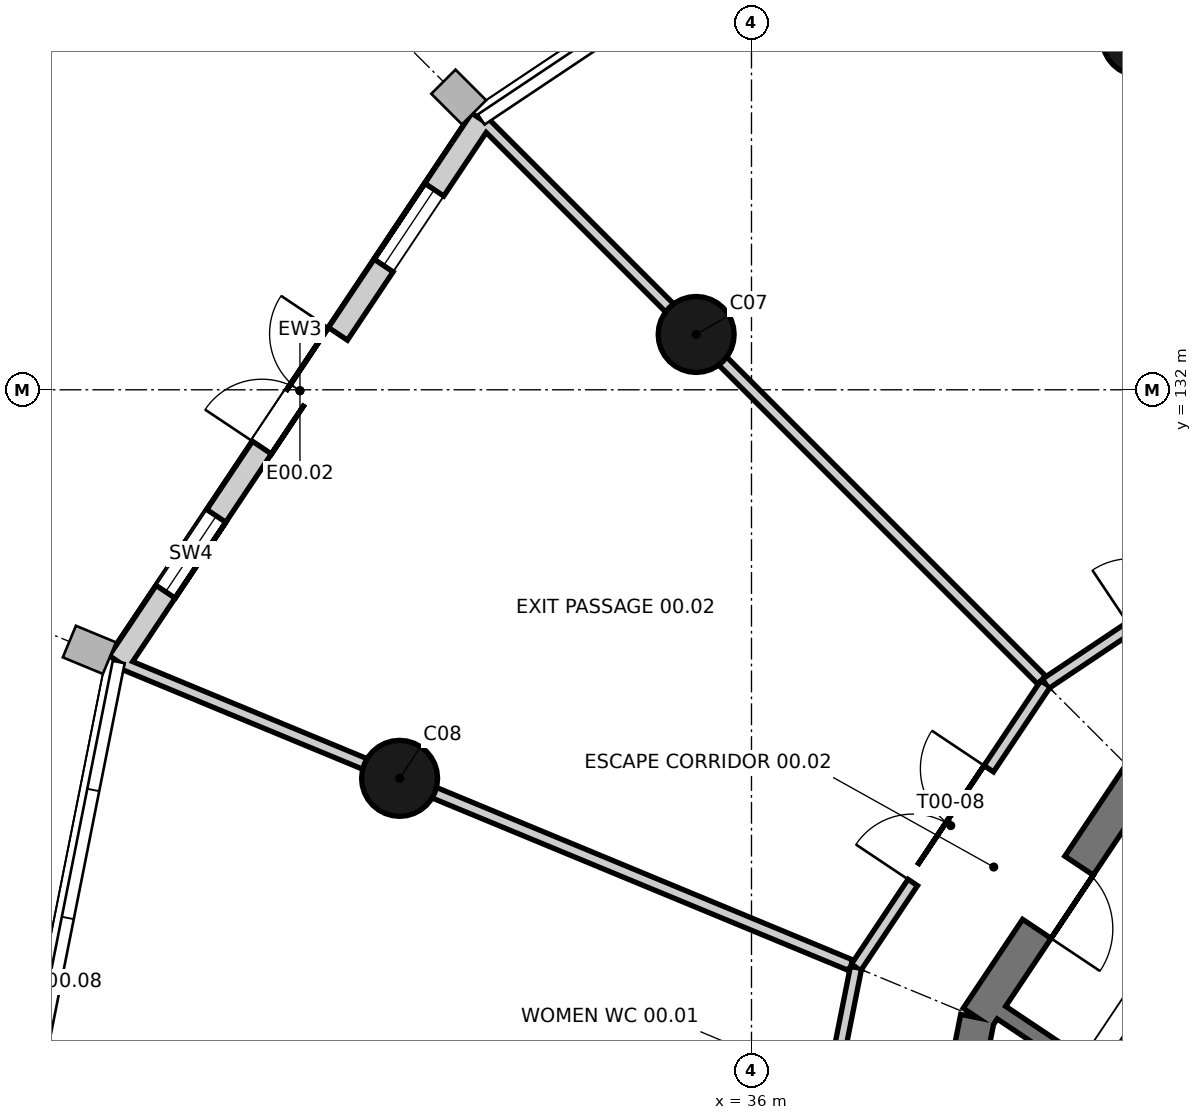
"""IFC4 building model, lengths in metres.
Left out: names, types, materials, properties, quantities, classifications, styles, units other than length and angle.
Written with IfcOpenShell. Run it as: python <this file> out.ifc"""

import sys

from ifc_helpers import new_model, si_unit, direction, frame, frame_2d, origin, origin_2d, place, context, subcontext, project, spatial, polyline, rectangle, circle, outline, extrude, element, fill, save


model = new_model("IFC4")
c1 = context("Model", 3, precision=1e-05, world=origin(), true_north=direction((0.0, 1.0)))
c2 = subcontext(c1, "Body", "Model", "MODEL_VIEW")
j1 = project(units=[si_unit("LENGTHUNIT", "METRE"), si_unit("PLANEANGLEUNIT", "RADIAN")], contexts=[c1])
p1 = place(None, origin())
s1 = spatial("IfcSite", under=j1, at=p1, CompositionType="ELEMENT")
p2 = place(p1, origin())
s2 = spatial("IfcBuilding", under=s1, at=p2, CompositionType="ELEMENT")
p3 = place(p2, origin())
s3 = spatial("IfcBuildingStorey", under=s2, at=p3, CompositionType="ELEMENT", Elevation=0.0)
p4 = place(p3, frame((41.091, 126.909, 0.0), z_axis=(0.0, 0.0, 1.0), x_axis=(-0.555542277102, -0.83148829117, 0.0)))
e1 = element("IfcWall", 1, at=p4, inside=s3, PredefinedType="SHEAR", context=c2, shape_type="SweptSolid", body=[
    extrude(outline(polyline([(-0.045, -0.225), (3.857, -0.225), (3.768, 0.225), (0.045, 0.225), (-0.045, -0.225)])), origin(), (0.0, 0.0, 1.0), 6.0),
])
p5 = place(p4, frame((1.406, 0.0, 0.0)))
e2 = element("IfcOpeningElement", 2, at=p5, cuts=e1, PredefinedType="OPENING", context=c2, shape_type="SweptSolid", body=[
    extrude(rectangle(XDim=1.0, YDim=2.1, at=frame_2d((0.5, 1.05))), frame((0.0, 0.235, 0.0), z_axis=(0.0, -1.0, 0.0), x_axis=(1.0, 0.0, 0.0)), (0.0, 0.0, 1.0), 0.47),
])
p6 = place(p3, frame((38.973, 123.739, 0.0), z_axis=(0.0, 0.0, 1.0), x_axis=(-0.195069197673, -0.98078948206, 0.0)))
e3 = element("IfcWall", 3, at=p6, inside=s3, PredefinedType="SHEAR", context=c2, shape_type="SweptSolid", body=[
    extrude(outline(polyline([(-0.045, -0.225), (3.857, -0.225), (3.768, 0.225), (0.045, 0.225), (-0.045, -0.225)])), origin(), (0.0, 0.0, 1.0), 6.0),
])
p7 = place(p6, frame((0.745, 0.0, 0.0)))
e4 = element("IfcOpeningElement", 4, at=p7, cuts=e3, PredefinedType="OPENING", context=c2, shape_type="SweptSolid", body=[
    extrude(rectangle(XDim=0.9, YDim=2.1, at=frame_2d((0.45, 1.05))), frame((0.0, 0.235, 0.0), z_axis=(0.0, -1.0, 0.0), x_axis=(1.0, 0.0, 0.0)), (0.0, 0.0, 1.0), 0.47),
])
p8 = place(p3, frame((45.774, 119.473, 0.0), z_axis=(0.0, 0.0, 1.0), x_axis=(-0.831486463828, 0.555545012102, 0.0)))
e5 = element("IfcWall", 5, at=p8, inside=s3, PredefinedType="SHEAR", context=c2, shape_type="SweptSolid", body=[
    extrude(rectangle(XDim=7.8, YDim=0.2, at=frame_2d((3.9, 0.0))), origin(), (0.0, 0.0, 1.0), 6.0),
])
for number, where, z_axis, x_axis in (
    (6, (41.112, 136.63, 0.0), (0.0, 0.0, 1.0), (1.0, 0.0, 0.0)),
    (7, (35.272, 132.728, 0.0), (0.0, 0.0, 1.0), (1.0, 0.0, 0.0)),
    (8, (31.37, 126.888, 0.0), (0.0, 0.0, 1.0), (1.0, 0.0, 0.0)),
):
    element("IfcColumn", number, at=place(p3, frame(where, z_axis=z_axis, x_axis=x_axis)), inside=s3, PredefinedType="COLUMN", context=c2, shape_type="SweptSolid", body=[
        extrude(circle(Radius=0.5, at=origin_2d()), origin(), (0.0, 0.0, 1.0), 6.0),
    ])
p9 = place(p3, frame((32.444, 135.556, 0.0), z_axis=(0.0, 0.0, 1.0), x_axis=(-0.555566251771, -0.831472272474, 0.0)))
e9 = element("IfcWall", 9, at=p9, inside=s3, PredefinedType="SOLIDWALL", context=c2, shape_type="SweptSolid", body=[
    extrude(outline(polyline([(-0.03, -0.15), (8.614, -0.15), (8.554, 0.15), (0.03, 0.15), (-0.03, -0.15)])), origin(), (0.0, 0.0, 1.0), 4.9),
])
p10 = place(p9, frame((3.392, 0.0, 0.0)))
e10 = element("IfcOpeningElement", 10, at=p10, cuts=e9, PredefinedType="OPENING", context=c2, shape_type="SweptSolid", body=[
    extrude(rectangle(XDim=1.8, YDim=2.1, at=frame_2d((0.9, 1.05))), frame((0.0, 0.16, 0.0), z_axis=(0.0, -1.0, 0.0), x_axis=(1.0, 0.0, 0.0)), (0.0, 0.0, 1.0), 0.32),
])
p11 = place(p9, frame((1.111, 0.0, 0.2)))
e11 = element("IfcOpeningElement", 11, at=p11, cuts=e9, PredefinedType="OPENING", context=c2, shape_type="SweptSolid", body=[
    extrude(rectangle(XDim=1.2, YDim=3.2, at=frame_2d((0.6, 1.6))), frame((0.0, 0.16, 0.0), z_axis=(0.0, -1.0, 0.0), x_axis=(1.0, 0.0, 0.0)), (0.0, 0.0, 1.0), 0.32),
])
p12 = place(p9, frame((6.273, 0.0, 0.2)))
e12 = element("IfcOpeningElement", 12, at=p12, cuts=e9, PredefinedType="OPENING", context=c2, shape_type="SweptSolid", body=[
    extrude(rectangle(XDim=1.2, YDim=3.2, at=frame_2d((0.6, 1.6))), frame((0.0, 0.16, 0.0), z_axis=(0.0, -1.0, 0.0), x_axis=(1.0, 0.0, 0.0)), (0.0, 0.0, 1.0), 0.32),
])
p13 = place(p3, frame((39.868, 128.132, 0.0), z_axis=(0.0, 0.0, 1.0), x_axis=(0.831455480489, 0.555591382192, 0.0)))
e13 = element("IfcWall", 13, at=p13, inside=s3, PredefinedType="PARTITIONING", context=c2, shape_type="SweptSolid", body=[
    extrude(rectangle(XDim=4.487, YDim=0.15, at=frame_2d((2.244, 0.0))), origin(), (0.0, 0.0, 1.0), 5.7),
])
p14 = place(p13, frame((1.344, 0.0, 0.0)))
e14 = element("IfcOpeningElement", 14, at=p14, cuts=e13, PredefinedType="OPENING", context=c2, shape_type="SweptSolid", body=[
    extrude(rectangle(XDim=1.8, YDim=2.1, at=frame_2d((0.9, 1.05))), frame((0.0, 0.085, 0.0), z_axis=(0.0, -1.0, 0.0), x_axis=(1.0, 0.0, 0.0)), (0.0, 0.0, 1.0), 0.17),
])
p15 = place(p3, frame((37.375, 124.401, 0.0), z_axis=(0.0, 0.0, 1.0), x_axis=(0.555591382192, 0.831455480489, 0.0)))
e15 = element("IfcWall", 15, at=p15, inside=s3, PredefinedType="PARTITIONING", context=c2, shape_type="SweptSolid", body=[
    extrude(rectangle(XDim=4.487, YDim=0.15, at=frame_2d((2.244, 0.0))), origin(), (0.0, 0.0, 1.0), 5.7),
])
p16 = place(p15, frame((1.344, 0.0, 0.0)))
e16 = element("IfcOpeningElement", 16, at=p16, cuts=e15, PredefinedType="OPENING", context=c2, shape_type="SweptSolid", body=[
    extrude(rectangle(XDim=1.8, YDim=2.1, at=frame_2d((0.9, 1.05))), frame((0.0, 0.085, 0.0), z_axis=(0.0, -1.0, 0.0), x_axis=(1.0, 0.0, 0.0)), (0.0, 0.0, 1.0), 0.17),
])
p17 = place(p3, frame((36.5, 120.0, 0.0), z_axis=(0.0, 0.0, 1.0), x_axis=(0.195111553866, 0.980781056887, 0.0)))
e17 = element("IfcWall", 17, at=p17, inside=s3, PredefinedType="PARTITIONING", context=c2, shape_type="SweptSolid", body=[
    extrude(rectangle(XDim=4.487, YDim=0.15, at=frame_2d((2.244, 0.0))), origin(), (0.0, 0.0, 1.0), 5.7),
])
p18 = place(p17, frame((1.344, 0.0, 0.0)))
e18 = element("IfcOpeningElement", 18, at=p18, cuts=e17, PredefinedType="OPENING", context=c2, shape_type="SweptSolid", body=[
    extrude(rectangle(XDim=1.8, YDim=2.1, at=frame_2d((0.9, 1.05))), frame((0.0, 0.085, 0.0), z_axis=(0.0, -1.0, 0.0), x_axis=(1.0, 0.0, 0.0)), (0.0, 0.0, 1.0), 0.17),
])
p19 = place(p3, frame((34.926, 133.074, 0.0), z_axis=(0.0, 0.0, 1.0), x_axis=(-0.707106781187, 0.707106781187, 0.0)))
e19 = element("IfcWall", 19, at=p19, inside=s3, PredefinedType="PARTITIONING", context=c2, shape_type="SweptSolid", body=[
    extrude(rectangle(XDim=3.448, YDim=0.15, at=frame_2d((1.724, 0.0))), origin(), (0.0, 0.0, 1.0), 4.9),
])
p20 = place(p3, frame((39.818, 128.182, 0.0), z_axis=(0.0, 0.0, 1.0), x_axis=(-0.707106781187, 0.707106781187, 0.0)))
e20 = element("IfcWall", 20, at=p20, inside=s3, PredefinedType="PARTITIONING", context=c2, shape_type="SweptSolid", body=[
    extrude(rectangle(XDim=5.938, YDim=0.15, at=frame_2d((2.969, 0.0))), origin(), (0.0, 0.0, 1.0), 4.9),
])
p21 = place(p3, frame((30.917, 127.076, 0.0), z_axis=(0.0, 0.0, 1.0), x_axis=(-0.923891721509, 0.382654004196, 0.0)))
e21 = element("IfcWall", 21, at=p21, inside=s3, PredefinedType="PARTITIONING", context=c2, shape_type="SweptSolid", body=[
    extrude(rectangle(XDim=3.448, YDim=0.15, at=frame_2d((1.724, 0.0))), origin(), (0.0, 0.0, 1.0), 4.9),
])
p22 = place(p3, frame((37.309, 124.428, 0.0), z_axis=(0.0, 0.0, 1.0), x_axis=(-0.923888564086, 0.382661627487, 0.0)))
e22 = element("IfcWall", 22, at=p22, inside=s3, PredefinedType="PARTITIONING", context=c2, shape_type="SweptSolid", body=[
    extrude(rectangle(XDim=5.938, YDim=0.15, at=frame_2d((2.969, 0.0))), origin(), (0.0, 0.0, 1.0), 4.9),
])
p23 = place(p10, frame((1.8, 0.0, 0.0), z_axis=(0.0, 0.0, 1.0), x_axis=(-1.0, 0.0, 0.0)))
e23 = element("IfcDoor", 23, at=p23, inside=s3, OperationType="DOUBLE_DOOR_SINGLE_SWING", PredefinedType="DOOR", context=c2, shape_type="SweptSolid", body=[
    extrude(rectangle(XDim=1.8, YDim=2.1, at=frame_2d((0.9, 1.05))), frame((0.0, 0.025, 0.0), z_axis=(0.0, -1.0, 0.0), x_axis=(1.0, 0.0, 0.0)), (0.0, 0.0, 1.0), 0.05),
])
fill(e10, e23)
p24 = place(p11, origin())
e24 = element("IfcWindow", 24, at=p24, inside=s3, PartitioningType="SINGLE_PANEL", PredefinedType="WINDOW", context=c2, shape_type="SweptSolid", body=[
    extrude(rectangle(XDim=1.2, YDim=3.2, at=frame_2d((0.6, 1.6))), frame((0.0, 0.03, 0.0), z_axis=(0.0, -1.0, 0.0), x_axis=(1.0, 0.0, 0.0)), (0.0, 0.0, 1.0), 0.06),
])
fill(e11, e24)
p25 = place(p12, origin())
e25 = element("IfcWindow", 25, at=p25, inside=s3, PartitioningType="SINGLE_PANEL", PredefinedType="WINDOW", context=c2, shape_type="SweptSolid", body=[
    extrude(rectangle(XDim=1.2, YDim=3.2, at=frame_2d((0.6, 1.6))), frame((0.0, 0.03, 0.0), z_axis=(0.0, -1.0, 0.0), x_axis=(1.0, 0.0, 0.0)), (0.0, 0.0, 1.0), 0.06),
])
fill(e12, e25)
p26 = place(p5, origin())
e26 = element("IfcDoor", 26, at=p26, inside=s3, OperationType="SINGLE_SWING_RIGHT", PredefinedType="DOOR", context=c2, shape_type="SweptSolid", body=[
    extrude(rectangle(XDim=1.0, YDim=2.1, at=frame_2d((0.5, 1.05))), frame((0.0, 0.025, 0.0), z_axis=(0.0, -1.0, 0.0), x_axis=(1.0, 0.0, 0.0)), (0.0, 0.0, 1.0), 0.05),
])
fill(e2, e26)
p27 = place(p16, origin())
e27 = element("IfcDoor", 27, at=p27, inside=s3, OperationType="DOUBLE_DOOR_SINGLE_SWING", PredefinedType="DOOR", context=c2, shape_type="SweptSolid", body=[
    extrude(rectangle(XDim=1.8, YDim=2.1, at=frame_2d((0.9, 1.05))), frame((0.0, 0.025, 0.0), z_axis=(0.0, -1.0, 0.0), x_axis=(1.0, 0.0, 0.0)), (0.0, 0.0, 1.0), 0.05),
])
fill(e16, e27)
save(model, sys.argv[1])
